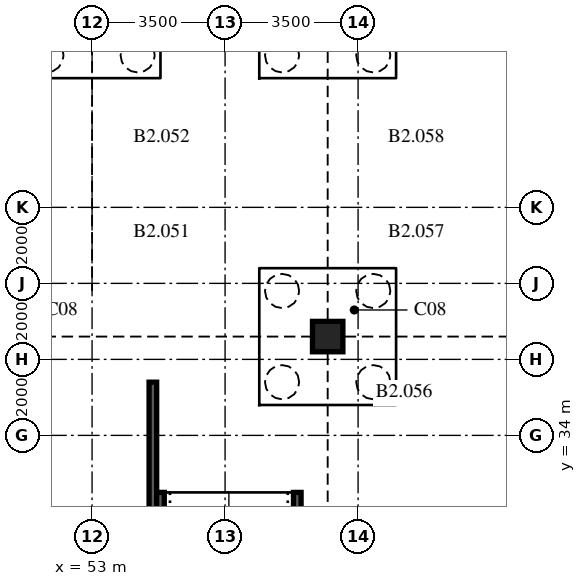
"""IFC4 building model, lengths in metres.
Left out: names, types, materials, properties, quantities, classifications, styles, units other than length and angle.
Written with IfcOpenShell. Run it as: python <this file> out.ifc"""

import sys

from ifc_helpers import new_model, si_unit, direction, frame, frame_2d, origin, origin_2d, place, context, subcontext, project, spatial, rectangle, extrude, element, save


model = new_model("IFC4")
c1 = context("Model", 3, precision=1e-05, world=origin(), true_north=direction((0.0, 1.0)))
c2 = subcontext(c1, "Body", "Model", "MODEL_VIEW")
j1 = project(units=[si_unit("LENGTHUNIT", "METRE"), si_unit("PLANEANGLEUNIT", "RADIAN")], contexts=[c1])
p1 = place(None, origin())
s1 = spatial("IfcSite", under=j1, at=p1, CompositionType="ELEMENT")
p2 = place(p1, origin())
s2 = spatial("IfcBuilding", under=s1, at=p2, CompositionType="ELEMENT")
p3 = place(p2, frame((0.0, 0.0, -7.5)))
s3 = spatial("IfcBuildingStorey", under=s2, at=p3, CompositionType="ELEMENT", Elevation=-7.5)
p4 = place(p3, frame((59.2, 36.6, -0.6), z_axis=(0.0, 0.0, 1.0), x_axis=(1.0, 0.0, 0.0)))
e1 = element("IfcColumn", 1, at=p4, inside=s3, PredefinedType="COLUMN", context=c2, shape_type="SweptSolid", body=[
    extrude(rectangle(XDim=0.8, YDim=0.8, at=origin_2d()), origin(), (0.0, 0.0, 1.0), 4.1),
])
p5 = place(p3, frame((54.6, 8.0, 0.0), z_axis=(0.0, 0.0, 1.0), x_axis=(0.0, 1.0, 0.0)))
e2 = element("IfcWall", 2, at=p5, inside=s3, PredefinedType="SOLIDWALL", context=c2, shape_type="SweptSolid", body=[
    extrude(rectangle(XDim=27.4, YDim=0.2, at=frame_2d((13.7, 0.0))), origin(), (0.0, 0.0, 1.0), 3.5),
])
p6 = place(p3, frame((54.8, 7.4, 0.0), z_axis=(0.0, 0.0, 1.0), x_axis=(0.0, 1.0, 0.0)))
e3 = element("IfcWall", 3, at=p6, inside=s3, PredefinedType="SOLIDWALL", context=c2, shape_type="SweptSolid", body=[
    extrude(rectangle(XDim=25.1, YDim=0.2, at=frame_2d((12.55, 0.0))), origin(), (0.0, 0.0, 1.0), 3.26),
])
p7 = place(p3, frame((58.4, 8.0, 0.0), z_axis=(0.0, 0.0, 1.0), x_axis=(0.0, 1.0, 0.0)))
e4 = element("IfcWall", 4, at=p7, inside=s3, PredefinedType="SOLIDWALL", context=c2, shape_type="SweptSolid", body=[
    extrude(rectangle(XDim=24.5, YDim=0.2, at=frame_2d((12.25, 0.0))), origin(), (0.0, 0.0, 1.0), 3.26),
])
save(model, sys.argv[1])
